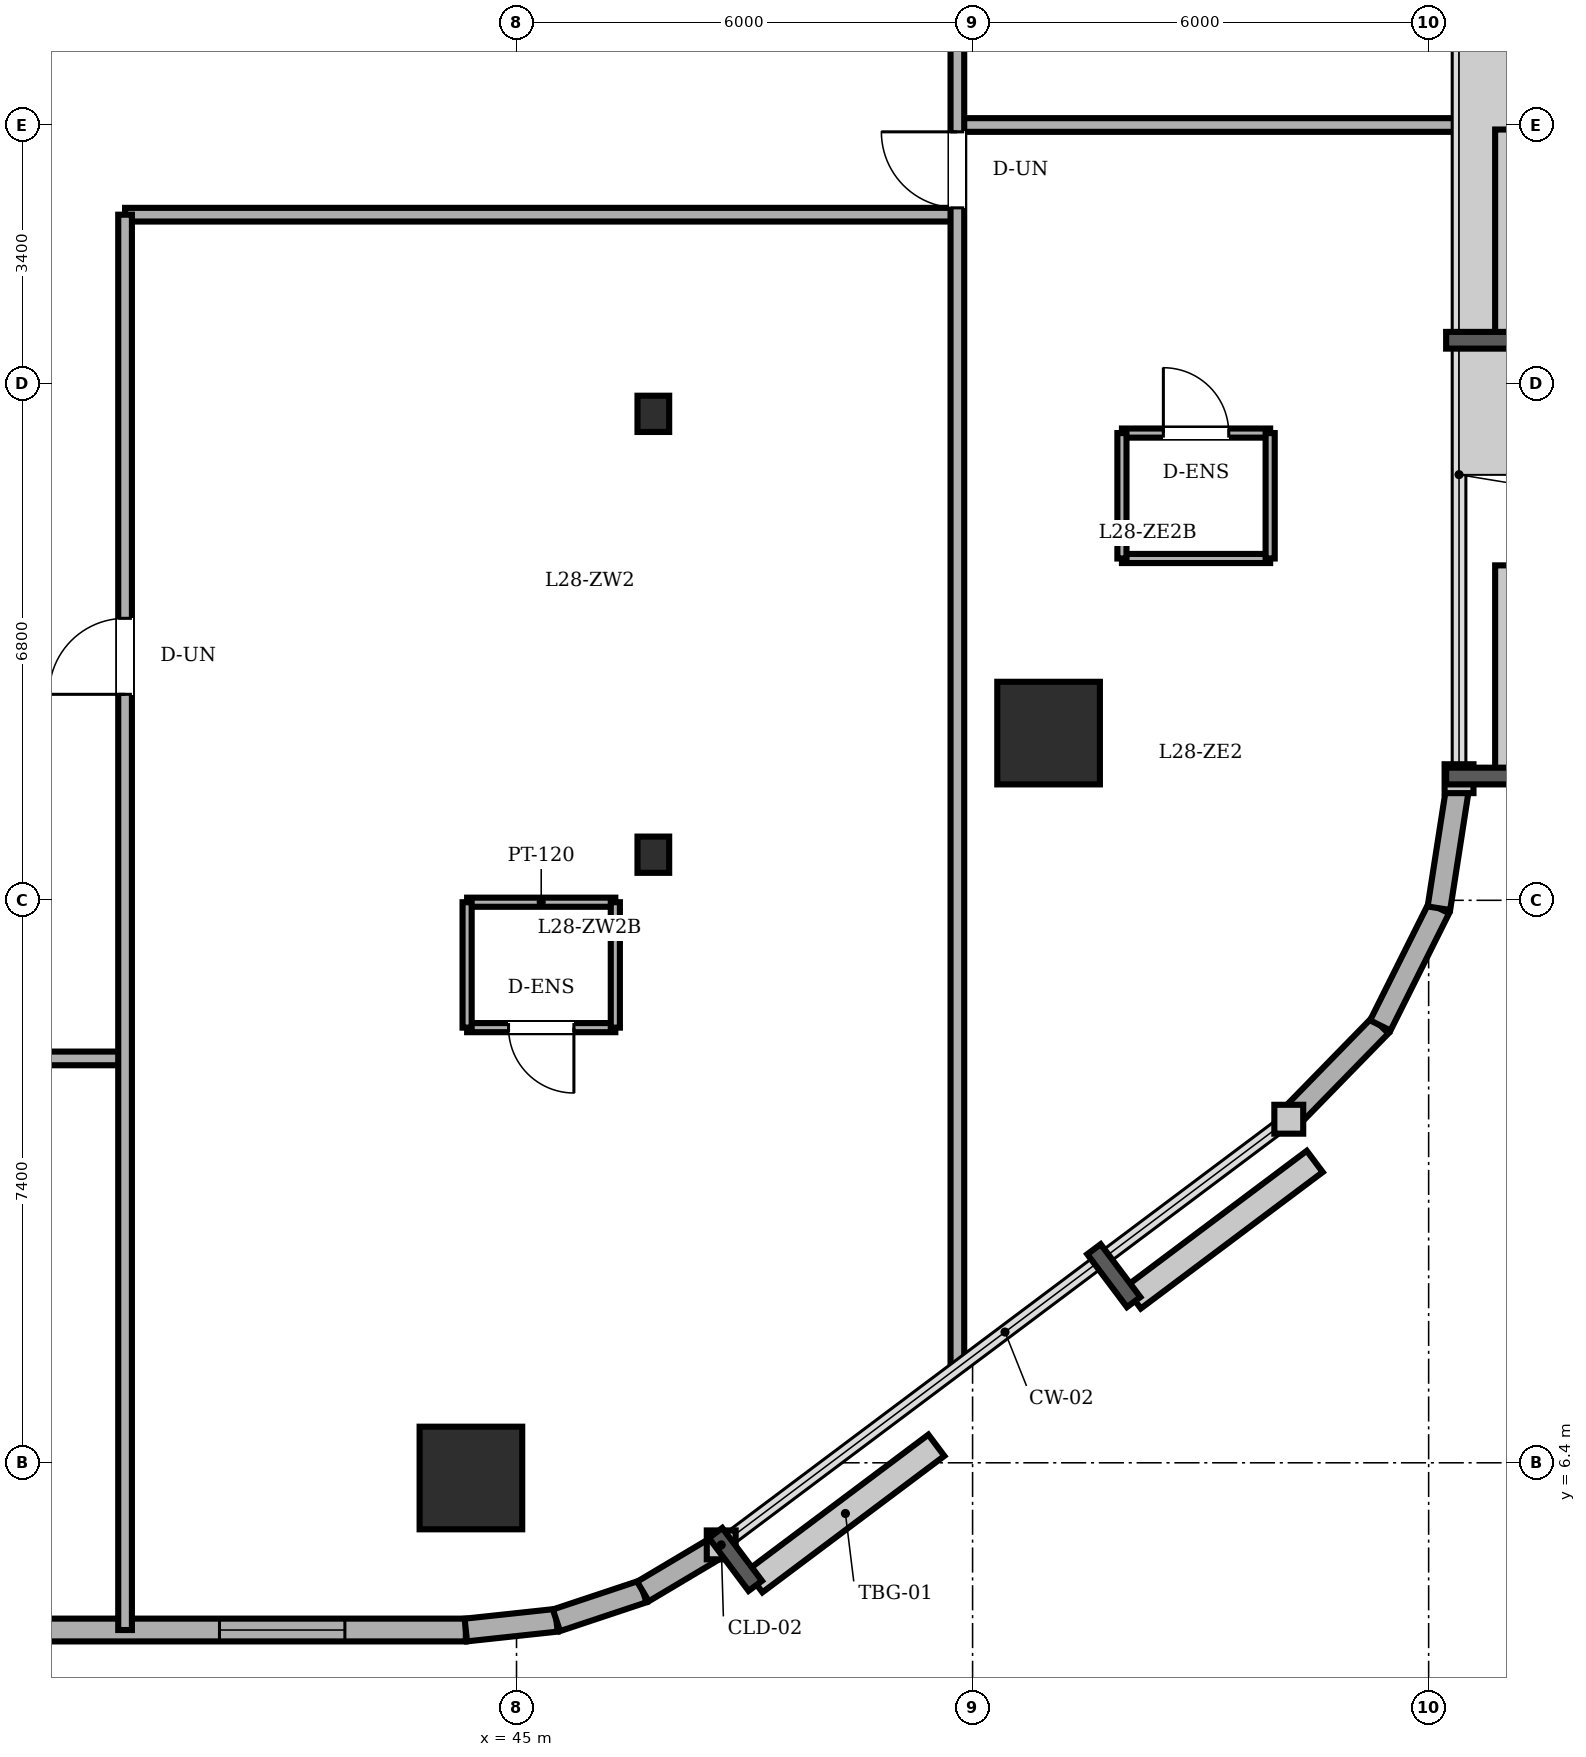
"""IFC4 building model, lengths in metres.
Left out: names, types, materials, properties, quantities, classifications, styles, units other than length and angle.
Written with IfcOpenShell. Run it as: python <this file> out.ifc"""

import sys

from ifc_helpers import new_model, si_unit, direction, frame, frame_2d, origin, origin_2d, place, context, subcontext, project, spatial, rectangle, circle, i_section, extrude, element, fill, save


model = new_model("IFC4")
c1 = context("Model", 3, precision=1e-05, world=origin(), true_north=direction((0.0, 1.0)))
c2 = subcontext(c1, "Body", "Model", "MODEL_VIEW")
j1 = project(units=[si_unit("LENGTHUNIT", "METRE"), si_unit("PLANEANGLEUNIT", "RADIAN")], contexts=[c1])
p1 = place(None, origin())
s1 = spatial("IfcSite", under=j1, at=p1, CompositionType="ELEMENT")
p2 = place(p1, origin())
s2 = spatial("IfcBuilding", under=s1, at=p2, CompositionType="ELEMENT")
p3 = place(p2, frame((0.0, 0.0, 107.9)))
s3 = spatial("IfcBuildingStorey", under=s2, at=p3, CompositionType="ELEMENT", Elevation=107.9)
for number, where, z_axis, x_axis in (
    (1, (44.4, 6.2, 0.0), (0.0, 0.0, 1.0), (1.0, 0.0, 0.0)),
    (2, (52.0, 16.0, 0.0), (0.0, 0.0, 1.0), (1.0, 0.0, 0.0)),
):
    element("IfcColumn", number, at=place(p3, frame(where, z_axis=z_axis, x_axis=x_axis)), inside=s3, PredefinedType="COLUMN", context=c2, shape_type="SweptSolid", body=[
        extrude(circle(Radius=0.675, at=origin_2d()), origin(), (0.0, 0.0, 1.0), 3.6),
    ])
for number, where, z_axis, x_axis in (
    (3, (46.8, 14.4, 0.0), (0.0, 0.0, 1.0), (1.0, 0.0, 0.0)),
    (4, (46.8, 20.2, 0.0), (0.0, 0.0, 1.0), (1.0, 0.0, 0.0)),
):
    element("IfcColumn", number, at=place(p3, frame(where, z_axis=z_axis, x_axis=x_axis)), inside=s3, PredefinedType="COLUMN", context=c2, shape_type="SweptSolid", body=[
        extrude(i_section(OverallWidth=0.417, OverallDepth=0.477, WebThickness=0.036, FlangeThickness=0.057, FilletRadius=0.015, at=origin_2d()), origin(), (0.0, 0.0, 1.0), 3.6),
    ])
p4 = place(p3, frame((14.4, 4.2, 0.0), z_axis=(0.0, 0.0, 1.0), x_axis=(1.0, 0.0, 0.0)))
e5 = element("IfcWall", 5, at=p4, inside=s3, PredefinedType="SOLIDWALL", context=c2, shape_type="SweptSolid", body=[
    extrude(rectangle(XDim=29.933, YDim=0.3, at=frame_2d((14.967, 0.0))), origin(), (0.0, 0.0, 1.0), 3.4),
])
p5 = place(p4, frame((12.975, 0.0, 0.0)))
e6 = element("IfcOpeningElement", 6, at=p5, cuts=e5, PredefinedType="OPENING", context=c2, shape_type="SweptSolid", body=[
    extrude(rectangle(XDim=0.95, YDim=2.2, at=frame_2d((0.475, 1.1))), frame((0.0, 0.16, 0.0), z_axis=(0.0, -1.0, 0.0), x_axis=(1.0, 0.0, 0.0)), (0.0, 0.0, 1.0), 0.32),
])
p6 = place(p4, frame((2.342, 0.0, 0.85)))
e7 = element("IfcOpeningElement", 7, at=p6, cuts=e5, PredefinedType="OPENING", context=c2, shape_type="SweptSolid", body=[
    extrude(rectangle(XDim=1.65, YDim=1.55, at=frame_2d((0.825, 0.775))), frame((0.0, 0.16, 0.0), z_axis=(0.0, -1.0, 0.0), x_axis=(1.0, 0.0, 0.0)), (0.0, 0.0, 1.0), 0.32),
])
p7 = place(p4, frame((5.158, 0.0, 0.85)))
e8 = element("IfcOpeningElement", 8, at=p7, cuts=e5, PredefinedType="OPENING", context=c2, shape_type="SweptSolid", body=[
    extrude(rectangle(XDim=1.65, YDim=1.55, at=frame_2d((0.825, 0.775))), frame((0.0, 0.16, 0.0), z_axis=(0.0, -1.0, 0.0), x_axis=(1.0, 0.0, 0.0)), (0.0, 0.0, 1.0), 0.32),
])
p8 = place(p4, frame((9.875, 0.0, 0.85)))
e9 = element("IfcOpeningElement", 9, at=p8, cuts=e5, PredefinedType="OPENING", context=c2, shape_type="SweptSolid", body=[
    extrude(rectangle(XDim=1.65, YDim=1.55, at=frame_2d((0.825, 0.775))), frame((0.0, 0.16, 0.0), z_axis=(0.0, -1.0, 0.0), x_axis=(1.0, 0.0, 0.0)), (0.0, 0.0, 1.0), 0.32),
])
p9 = place(p4, frame((16.058, 0.0, 0.85)))
e10 = element("IfcOpeningElement", 10, at=p9, cuts=e5, PredefinedType="OPENING", context=c2, shape_type="SweptSolid", body=[
    extrude(rectangle(XDim=1.65, YDim=1.55, at=frame_2d((0.825, 0.775))), frame((0.0, 0.16, 0.0), z_axis=(0.0, -1.0, 0.0), x_axis=(1.0, 0.0, 0.0)), (0.0, 0.0, 1.0), 0.32),
])
p10 = place(p4, frame((20.342, 0.0, 0.85)))
e11 = element("IfcOpeningElement", 11, at=p10, cuts=e5, PredefinedType="OPENING", context=c2, shape_type="SweptSolid", body=[
    extrude(rectangle(XDim=1.65, YDim=1.55, at=frame_2d((0.825, 0.775))), frame((0.0, 0.16, 0.0), z_axis=(0.0, -1.0, 0.0), x_axis=(1.0, 0.0, 0.0)), (0.0, 0.0, 1.0), 0.32),
])
p11 = place(p4, frame((26.692, 0.0, 0.85)))
e12 = element("IfcOpeningElement", 12, at=p11, cuts=e5, PredefinedType="OPENING", context=c2, shape_type="SweptSolid", body=[
    extrude(rectangle(XDim=1.65, YDim=1.55, at=frame_2d((0.825, 0.775))), frame((0.0, 0.16, 0.0), z_axis=(0.0, -1.0, 0.0), x_axis=(1.0, 0.0, 0.0)), (0.0, 0.0, 1.0), 0.32),
])
p12 = place(p3, frame((44.333, 4.2, 0.0), z_axis=(0.0, 0.0, 1.0), x_axis=(0.994289103787, 0.106720092254, 0.0)))
e13 = element("IfcWall", 13, at=p12, inside=s3, PredefinedType="SOLIDWALL", context=c2, shape_type="SweptSolid", body=[
    extrude(rectangle(XDim=1.199, YDim=0.3, at=frame_2d((0.599, 0.0))), origin(), (0.0, 0.0, 1.0), 3.4),
])
p13 = place(p3, frame((45.525, 4.328, 0.0), z_axis=(0.0, 0.0, 1.0), x_axis=(0.948744332129, 0.316044604847, 0.0)))
e14 = element("IfcWall", 14, at=p13, inside=s3, PredefinedType="SOLIDWALL", context=c2, shape_type="SweptSolid", body=[
    extrude(rectangle(XDim=1.2, YDim=0.3, at=frame_2d((0.6, 0.0))), origin(), (0.0, 0.0, 1.0), 3.4),
])
p14 = place(p3, frame((46.663, 4.707, 0.0), z_axis=(0.0, 0.0, 1.0), x_axis=(0.859320591642, 0.511437308749, 0.0)))
e15 = element("IfcWall", 15, at=p14, inside=s3, PredefinedType="SOLIDWALL", context=c2, shape_type="SweptSolid", body=[
    extrude(rectangle(XDim=1.199, YDim=0.3, at=frame_2d((0.599, 0.0))), origin(), (0.0, 0.0, 1.0), 3.4),
])
for number, where, z_axis, x_axis in (
    (16, (55.16, 10.92, 0.0), (0.0, 0.0, 1.0), (0.698, 0.716, 0.0)),
    (17, (56.364, 12.154, 0.0), (0.0, 0.0, 1.0), (0.447, 0.894, 0.0)),
):
    element("IfcWall", number, at=place(p3, frame(where, z_axis=z_axis, x_axis=x_axis)), inside=s3, PredefinedType="SOLIDWALL", context=c2, shape_type="SweptSolid", body=[
        extrude(rectangle(XDim=1.724, YDim=0.3, at=frame_2d((0.862, 0.0))), origin(), (0.0, 0.0, 1.0), 3.4),
    ])
p15 = place(p3, frame((57.135, 13.696, 0.0), z_axis=(0.0, 0.0, 1.0), x_axis=(0.153620989032, 0.988129845581, 0.0)))
e18 = element("IfcWall", 18, at=p15, inside=s3, PredefinedType="SOLIDWALL", context=c2, shape_type="SweptSolid", body=[
    extrude(rectangle(XDim=1.724, YDim=0.3, at=frame_2d((0.862, 0.0))), origin(), (0.0, 0.0, 1.0), 3.4),
])
p16 = place(p3, frame((44.35, 13.775, 0.0), z_axis=(0.0, 0.0, 1.0), x_axis=(1.0, 0.0, 0.0)))
e19 = element("IfcWall", 19, at=p16, inside=s3, PredefinedType="PARTITIONING", context=c2, shape_type="SweptSolid", body=[
    extrude(rectangle(XDim=1.95, YDim=0.12, at=frame_2d((0.975, 0.0))), origin(), (0.0, 0.0, 1.0), 3.4),
])
p17 = place(p3, frame((46.3, 12.125, 0.0), z_axis=(0.0, 0.0, 1.0), x_axis=(-1.0, 0.0, 0.0)))
e20 = element("IfcWall", 20, at=p17, inside=s3, PredefinedType="PARTITIONING", context=c2, shape_type="SweptSolid", body=[
    extrude(rectangle(XDim=1.95, YDim=0.12, at=frame_2d((0.975, 0.0))), origin(), (0.0, 0.0, 1.0), 3.4),
])
p18 = place(p17, frame((0.545, 0.0, 0.0)))
e21 = element("IfcOpeningElement", 21, at=p18, cuts=e20, PredefinedType="OPENING", context=c2, shape_type="SweptSolid", body=[
    extrude(rectangle(XDim=0.86, YDim=2.1, at=frame_2d((0.43, 1.05))), frame((0.0, 0.07, 0.0), z_axis=(0.0, -1.0, 0.0), x_axis=(1.0, 0.0, 0.0)), (0.0, 0.0, 1.0), 0.14),
])
p19 = place(p3, frame((44.35, 13.775, 0.0), z_axis=(0.0, 0.0, 1.0), x_axis=(0.0, -1.0, 0.0)))
e22 = element("IfcWall", 22, at=p19, inside=s3, PredefinedType="PARTITIONING", context=c2, shape_type="SweptSolid", body=[
    extrude(rectangle(XDim=1.65, YDim=0.12, at=frame_2d((0.825, 0.0))), origin(), (0.0, 0.0, 1.0), 3.4),
])
p20 = place(p3, frame((46.3, 12.125, 0.0), z_axis=(0.0, 0.0, 1.0), x_axis=(0.0, 1.0, 0.0)))
e23 = element("IfcWall", 23, at=p20, inside=s3, PredefinedType="PARTITIONING", context=c2, shape_type="SweptSolid", body=[
    extrude(rectangle(XDim=1.65, YDim=0.12, at=frame_2d((0.825, 0.0))), origin(), (0.0, 0.0, 1.0), 2.882),
])
p21 = place(p3, frame((52.965, 19.947, 0.0), z_axis=(0.0, 0.0, 1.0), x_axis=(1.0, 0.0, 0.0)))
e24 = element("IfcWall", 24, at=p21, inside=s3, PredefinedType="PARTITIONING", context=c2, shape_type="SweptSolid", body=[
    extrude(rectangle(XDim=1.95, YDim=0.12, at=frame_2d((0.975, 0.0))), origin(), (0.0, 0.0, 1.0), 3.4),
])
p22 = place(p21, frame((0.545, 0.0, 0.0)))
e25 = element("IfcOpeningElement", 25, at=p22, cuts=e24, PredefinedType="OPENING", context=c2, shape_type="SweptSolid", body=[
    extrude(rectangle(XDim=0.86, YDim=2.1, at=frame_2d((0.43, 1.05))), frame((0.0, 0.07, 0.0), z_axis=(0.0, -1.0, 0.0), x_axis=(1.0, 0.0, 0.0)), (0.0, 0.0, 1.0), 0.14),
])
p23 = place(p3, frame((54.915, 18.297, 0.0), z_axis=(0.0, 0.0, 1.0), x_axis=(-1.0, 0.0, 0.0)))
e26 = element("IfcWall", 26, at=p23, inside=s3, PredefinedType="PARTITIONING", context=c2, shape_type="SweptSolid", body=[
    extrude(rectangle(XDim=1.95, YDim=0.12, at=frame_2d((0.975, 0.0))), origin(), (0.0, 0.0, 1.0), 3.4),
])
for number, where, z_axis, x_axis in (
    (27, (52.965, 19.947, 0.0), (0.0, 0.0, 1.0), (0.0, -1.0, 0.0)),
    (28, (54.915, 18.297, 0.0), (0.0, 0.0, 1.0), (0.0, 1.0, 0.0)),
):
    element("IfcWall", number, at=place(p3, frame(where, z_axis=z_axis, x_axis=x_axis)), inside=s3, PredefinedType="PARTITIONING", context=c2, shape_type="SweptSolid", body=[
        extrude(rectangle(XDim=1.65, YDim=0.12, at=frame_2d((0.825, 0.0))), origin(), (0.0, 0.0, 1.0), 3.4),
    ])
p24 = place(p3, frame((8.8, 11.72, 0.0), z_axis=(0.0, 0.0, 1.0), x_axis=(1.0, 0.0, 0.0)))
e29 = element("IfcWall", 29, at=p24, inside=s3, PredefinedType="PARTITIONING", context=c2, shape_type="SweptSolid", body=[
    extrude(rectangle(XDim=31.05, YDim=0.18, at=frame_2d((15.525, 0.0))), origin(), (0.0, 0.0, 1.0), 3.4),
])
p25 = place(p24, frame((15.84, 0.0, 0.0)))
e30 = element("IfcOpeningElement", 30, at=p25, cuts=e29, PredefinedType="OPENING", context=c2, shape_type="SweptSolid", body=[
    extrude(rectangle(XDim=0.92, YDim=2.1, at=frame_2d((0.46, 1.05))), frame((0.0, 0.1, 0.0), z_axis=(0.0, -1.0, 0.0), x_axis=(1.0, 0.0, 0.0)), (0.0, 0.0, 1.0), 0.2),
])
p26 = place(p24, frame((7.34, 0.0, 0.0)))
e31 = element("IfcOpeningElement", 31, at=p26, cuts=e29, PredefinedType="OPENING", context=c2, shape_type="SweptSolid", body=[
    extrude(rectangle(XDim=0.92, YDim=2.1, at=frame_2d((0.46, 1.05))), frame((0.0, 0.1, 0.0), z_axis=(0.0, -1.0, 0.0), x_axis=(1.0, 0.0, 0.0)), (0.0, 0.0, 1.0), 0.2),
])
p27 = place(p24, frame((23.905, 0.0, 0.0)))
e32 = element("IfcOpeningElement", 32, at=p27, cuts=e29, PredefinedType="OPENING", context=c2, shape_type="SweptSolid", body=[
    extrude(rectangle(XDim=0.92, YDim=2.1, at=frame_2d((0.46, 1.05))), frame((0.0, 0.1, 0.0), z_axis=(0.0, -1.0, 0.0), x_axis=(1.0, 0.0, 0.0)), (0.0, 0.0, 1.0), 0.2),
])
p28 = place(p3, frame((39.85, 22.82, 0.0), z_axis=(0.0, 0.0, 1.0), x_axis=(1.0, 0.0, 0.0)))
e33 = element("IfcWall", 33, at=p28, inside=s3, PredefinedType="PARTITIONING", context=c2, shape_type="SweptSolid", body=[
    extrude(rectangle(XDim=10.95, YDim=0.18, at=frame_2d((5.475, 0.0))), origin(), (0.0, 0.0, 1.0), 3.4),
])
p29 = place(p3, frame((50.8, 24.0, 0.0), z_axis=(0.0, 0.0, 1.0), x_axis=(1.0, 0.0, 0.0)))
e34 = element("IfcWall", 34, at=p29, inside=s3, PredefinedType="PARTITIONING", context=c2, shape_type="SweptSolid", body=[
    extrude(rectangle(XDim=6.6, YDim=0.18, at=frame_2d((3.3, 0.0))), origin(), (0.0, 0.0, 1.0), 3.022),
])
p30 = place(p3, frame((39.85, 4.2, 0.0), z_axis=(0.0, 0.0, 1.0), x_axis=(0.0, 1.0, 0.0)))
e35 = element("IfcWall", 35, at=p30, inside=s3, PredefinedType="PARTITIONING", context=c2, shape_type="SweptSolid", body=[
    extrude(rectangle(XDim=18.62, YDim=0.18, at=frame_2d((9.31, 0.0))), origin(), (0.0, 0.0, 1.0), 3.4),
])
p31 = place(p30, frame((12.31, 0.0, 0.0)))
e36 = element("IfcOpeningElement", 36, at=p31, cuts=e35, PredefinedType="OPENING", context=c2, shape_type="SweptSolid", body=[
    extrude(rectangle(XDim=1.0, YDim=2.15, at=frame_2d((0.5, 1.075))), frame((0.0, 0.1, 0.0), z_axis=(0.0, -1.0, 0.0), x_axis=(1.0, 0.0, 0.0)), (0.0, 0.0, 1.0), 0.2),
])
p32 = place(p3, frame((50.8, 7.65, 0.0), z_axis=(0.0, 0.0, 1.0), x_axis=(0.0, 1.0, 0.0)))
e37 = element("IfcWall", 37, at=p32, inside=s3, PredefinedType="PARTITIONING", context=c2, shape_type="SweptSolid", body=[
    extrude(rectangle(XDim=22.7, YDim=0.18, at=frame_2d((11.35, 0.0))), origin(), (0.0, 0.0, 1.0), 3.4),
])
p33 = place(p32, frame((18.765, 0.0, 0.0)))
e38 = element("IfcOpeningElement", 38, at=p33, cuts=e37, PredefinedType="OPENING", context=c2, shape_type="SweptSolid", body=[
    extrude(rectangle(XDim=1.0, YDim=2.15, at=frame_2d((0.5, 1.075))), frame((0.0, 0.1, 0.0), z_axis=(0.0, -1.0, 0.0), x_axis=(1.0, 0.0, 0.0)), (0.0, 0.0, 1.0), 0.2),
])
p34 = place(p32, frame((15.26, 0.0, 0.0)))
e39 = element("IfcOpeningElement", 39, at=p34, cuts=e37, PredefinedType="OPENING", context=c2, shape_type="SweptSolid", body=[
    extrude(rectangle(XDim=1.0, YDim=2.15, at=frame_2d((0.5, 1.075))), frame((0.0, 0.1, 0.0), z_axis=(0.0, -1.0, 0.0), x_axis=(1.0, 0.0, 0.0)), (0.0, 0.0, 1.0), 0.2),
])
p35 = place(p11, origin())
e40 = element("IfcWindow", 40, at=p35, inside=s3, PartitioningType="DOUBLE_PANEL_VERTICAL", PredefinedType="WINDOW", context=c2, shape_type="SweptSolid", body=[
    extrude(rectangle(XDim=1.65, YDim=1.55, at=frame_2d((0.825, 0.775))), frame((0.0, 0.03, 0.0), z_axis=(0.0, -1.0, 0.0), x_axis=(1.0, 0.0, 0.0)), (0.0, 0.0, 1.0), 0.06),
])
fill(e12, e40)
p36 = place(p18, origin())
e41 = element("IfcDoor", 41, at=p36, inside=s3, OperationType="SINGLE_SWING_LEFT", PredefinedType="DOOR", context=c2, shape_type="SweptSolid", body=[
    extrude(rectangle(XDim=0.86, YDim=2.1, at=frame_2d((0.43, 1.05))), frame((0.0, 0.025, 0.0), z_axis=(0.0, -1.0, 0.0), x_axis=(1.0, 0.0, 0.0)), (0.0, 0.0, 1.0), 0.05),
])
fill(e21, e41)
p37 = place(p22, origin())
e42 = element("IfcDoor", 42, at=p37, inside=s3, OperationType="SINGLE_SWING_LEFT", PredefinedType="DOOR", context=c2, shape_type="SweptSolid", body=[
    extrude(rectangle(XDim=0.86, YDim=2.1, at=frame_2d((0.43, 1.05))), frame((0.0, 0.025, 0.0), z_axis=(0.0, -1.0, 0.0), x_axis=(1.0, 0.0, 0.0)), (0.0, 0.0, 1.0), 0.05),
])
fill(e25, e42)
p38 = place(p31, origin())
e43 = element("IfcDoor", 43, at=p38, inside=s3, OperationType="SINGLE_SWING_LEFT", PredefinedType="DOOR", context=c2, shape_type="SweptSolid", body=[
    extrude(rectangle(XDim=1.0, YDim=2.15, at=frame_2d((0.5, 1.075))), frame((0.0, 0.025, 0.0), z_axis=(0.0, -1.0, 0.0), x_axis=(1.0, 0.0, 0.0)), (0.0, 0.0, 1.0), 0.05),
])
fill(e36, e43)
p39 = place(p34, origin())
e44 = element("IfcDoor", 44, at=p39, inside=s3, OperationType="SINGLE_SWING_RIGHT", PredefinedType="DOOR", context=c2, shape_type="SweptSolid", body=[
    extrude(rectangle(XDim=1.0, YDim=2.15, at=frame_2d((0.5, 1.075))), frame((0.0, 0.025, 0.0), z_axis=(0.0, -1.0, 0.0), x_axis=(1.0, 0.0, 0.0)), (0.0, 0.0, 1.0), 0.05),
])
fill(e39, e44)
save(model, sys.argv[1])
